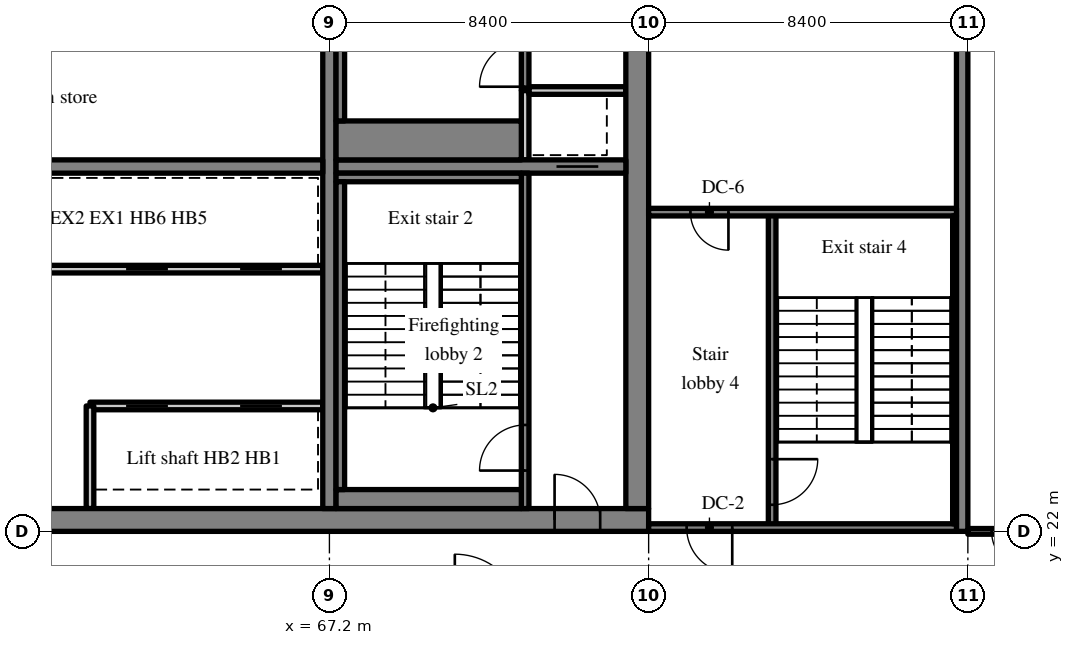
"""IFC4 building model, lengths in metres.
Left out: names, types, materials, properties, quantities, classifications, styles, units other than length and angle.
Written with IfcOpenShell. Run it as: python <this file> out.ifc"""

import sys

from ifc_helpers import new_model, si_unit, direction, frame, frame_2d, origin, place, context, subcontext, project, spatial, rectangle, extrude, source, transform, mapped, element, fill, save


model = new_model("IFC4")
c1 = context("Model", 3, precision=1e-05, world=origin(), true_north=direction((0.0, 1.0)))
c2 = subcontext(c1, "Body", "Model", "MODEL_VIEW")
j1 = project(units=[si_unit("LENGTHUNIT", "METRE"), si_unit("PLANEANGLEUNIT", "RADIAN")], contexts=[c1])
p1 = place(None, origin())
s1 = spatial("IfcSite", under=j1, at=p1, CompositionType="ELEMENT")
p2 = place(p1, origin())
s2 = spatial("IfcBuilding", under=s1, at=p2, CompositionType="ELEMENT")
p3 = place(p2, frame((0.0, 0.0, 229.6)))
s3 = spatial("IfcBuildingStorey", under=s2, at=p3, CompositionType="ELEMENT", Elevation=229.6)
m1 = source(origin(), c2, "Body", "SweptSolid", [
    extrude(rectangle(XDim=50.4, YDim=0.6, at=frame_2d((25.2, 0.0))), origin(), (0.0, 0.0, 1.0), 3.62),
])
p4 = place(p3, frame((25.2, 22.3, 0.0), z_axis=(0.0, 0.0, 1.0), x_axis=(1.0, 0.0, 0.0)))
e1 = element("IfcWall", 1, at=p4, inside=s3, PredefinedType="SHEAR", context=c2, shape_type="MappedRepresentation", body=[
    mapped(m1, transform((0.0, 0.0, 0.0), scale=1.0)),
])
m2 = source(origin(), c2, "Body", "SweptSolid", [
    extrude(rectangle(XDim=1.8, YDim=2.1, at=frame_2d((0.9, 1.05))), frame((0.0, 0.31, 0.0), z_axis=(0.0, -1.0, 0.0), x_axis=(1.0, 0.0, 0.0)), (0.0, 0.0, 1.0), 0.62),
])
p5 = place(p4, frame((15.9, 0.0, 0.0)))
e2 = element("IfcOpeningElement", 2, at=p5, cuts=e1, PredefinedType="OPENING", context=c2, shape_type="MappedRepresentation", body=[
    mapped(m2, transform((0.0, 0.0, 0.0), scale=1.0)),
])
m3 = source(origin(), c2, "Body", "SweptSolid", [
    extrude(rectangle(XDim=0.9, YDim=2.1, at=frame_2d((0.45, 1.05))), frame((0.0, 0.31, 0.0), z_axis=(0.0, -1.0, 0.0), x_axis=(1.0, 0.0, 0.0)), (0.0, 0.0, 1.0), 0.62),
])
p6 = place(p4, frame((11.187, 0.0, 0.0)))
e3 = element("IfcOpeningElement", 3, at=p6, cuts=e1, PredefinedType="OPENING", context=c2, shape_type="MappedRepresentation", body=[
    mapped(m3, transform((0.0, 0.0, 0.0), scale=1.0)),
])
p7 = place(p4, frame((21.513, 0.0, 0.0)))
e4 = element("IfcOpeningElement", 4, at=p7, cuts=e1, PredefinedType="OPENING", context=c2, shape_type="MappedRepresentation", body=[
    mapped(m3, transform((0.0, 0.0, 0.0), scale=1.0)),
])
p8 = place(p4, frame((32.7, 0.0, 0.0)))
e5 = element("IfcOpeningElement", 5, at=p8, cuts=e1, PredefinedType="OPENING", context=c2, shape_type="MappedRepresentation", body=[
    mapped(m2, transform((0.0, 0.0, 0.0), scale=1.0)),
])
m4 = source(origin(), c2, "Body", "SweptSolid", [
    extrude(rectangle(XDim=1.2, YDim=2.1, at=frame_2d((0.6, 1.05))), frame((0.0, 0.31, 0.0), z_axis=(0.0, -1.0, 0.0), x_axis=(1.0, 0.0, 0.0)), (0.0, 0.0, 1.0), 0.62),
])
p9 = place(p4, frame((6.488, 0.0, 0.0)))
e6 = element("IfcOpeningElement", 6, at=p9, cuts=e1, PredefinedType="OPENING", context=c2, shape_type="MappedRepresentation", body=[
    mapped(m4, transform((0.0, 0.0, 0.0), scale=1.0)),
])
p10 = place(p4, frame((47.925, 0.0, 0.0)))
e7 = element("IfcOpeningElement", 7, at=p10, cuts=e1, PredefinedType="OPENING", context=c2, shape_type="MappedRepresentation", body=[
    mapped(m4, transform((0.0, 0.0, 0.0), scale=1.0)),
])
m5 = source(origin(), c2, "Body", "SweptSolid", [
    extrude(rectangle(XDim=18.8, YDim=0.6, at=frame_2d((9.4, 0.0))), origin(), (0.0, 0.0, 1.0), 3.62),
])
p11 = place(p3, frame((75.3, 22.6, 0.0), z_axis=(0.0, 0.0, 1.0), x_axis=(0.0, 1.0, 0.0)))
e8 = element("IfcWall", 8, at=p11, inside=s3, PredefinedType="SHEAR", context=c2, shape_type="MappedRepresentation", body=[
    mapped(m5, transform((0.0, 0.0, 0.0), scale=1.0)),
])
p12 = place(p11, frame((12.8, 0.0, 0.0)))
e9 = element("IfcOpeningElement", 9, at=p12, cuts=e8, PredefinedType="OPENING", context=c2, shape_type="MappedRepresentation", body=[
    mapped(m4, transform((0.0, 0.0, 0.0), scale=1.0)),
])
m6 = source(origin(), c2, "Body", "SweptSolid", [
    extrude(rectangle(XDim=18.8, YDim=0.35, at=frame_2d((9.4, 0.0))), origin(), (0.0, 0.0, 1.0), 3.62),
])
p13 = place(p3, frame((67.2, 22.6, 0.0), z_axis=(0.0, 0.0, 1.0), x_axis=(0.0, 1.0, 0.0)))
e10 = element("IfcWall", 10, at=p13, inside=s3, PredefinedType="SHEAR", context=c2, shape_type="MappedRepresentation", body=[
    mapped(m6, transform((0.0, 0.0, 0.0), scale=1.0)),
])
m7 = source(origin(), c2, "Body", "SweptSolid", [
    extrude(rectangle(XDim=16.45, YDim=0.35, at=frame_2d((8.225, 0.0))), origin(), (0.0, 0.0, 1.0), 3.62),
])
p14 = place(p3, frame((50.575, 31.6, 0.0), z_axis=(0.0, 0.0, 1.0), x_axis=(1.0, 0.0, 0.0)))
e11 = element("IfcWall", 11, at=p14, inside=s3, PredefinedType="SHEAR", context=c2, shape_type="MappedRepresentation", body=[
    mapped(m7, transform((0.0, 0.0, 0.0), scale=1.0)),
])
m8 = source(origin(), c2, "Body", "SweptSolid", [
    extrude(rectangle(XDim=1.0, YDim=2.1, at=frame_2d((0.5, 1.05))), frame((0.0, 0.185, 0.0), z_axis=(0.0, -1.0, 0.0), x_axis=(1.0, 0.0, 0.0)), (0.0, 0.0, 1.0), 0.37),
])
p15 = place(p14, frame((0.613, 0.0, 0.0)))
e12 = element("IfcOpeningElement", 12, at=p15, cuts=e11, PredefinedType="OPENING", context=c2, shape_type="MappedRepresentation", body=[
    mapped(m8, transform((0.0, 0.0, 0.0), scale=1.0)),
])
m9 = source(origin(), c2, "Body", "SweptSolid", [
    extrude(rectangle(XDim=7.625, YDim=0.35, at=frame_2d((3.812, 0.0))), origin(), (0.0, 0.0, 1.0), 3.62),
])
p16 = place(p3, frame((67.375, 31.6, 0.0), z_axis=(0.0, 0.0, 1.0), x_axis=(1.0, 0.0, 0.0)))
e13 = element("IfcWall", 13, at=p16, inside=s3, PredefinedType="SHEAR", context=c2, shape_type="MappedRepresentation", body=[
    mapped(m9, transform((0.0, 0.0, 0.0), scale=1.0)),
])
m10 = source(origin(), c2, "Body", "SweptSolid", [
    extrude(rectangle(XDim=1.1, YDim=2.1, at=frame_2d((0.55, 1.05))), frame((0.0, 0.185, 0.0), z_axis=(0.0, -1.0, 0.0), x_axis=(1.0, 0.0, 0.0)), (0.0, 0.0, 1.0), 0.37),
])
p17 = place(p16, frame((5.8, 0.0, 0.0)))
e14 = element("IfcOpeningElement", 14, at=p17, cuts=e13, PredefinedType="OPENING", context=c2, shape_type="MappedRepresentation", body=[
    mapped(m10, transform((0.0, 0.0, 0.0), scale=1.0)),
])
m11 = source(origin(), c2, "Body", "SweptSolid", [
    extrude(rectangle(XDim=18.4, YDim=0.3, at=frame_2d((9.2, 0.0))), origin(), (0.0, 0.0, 1.0), 3.62),
])
p18 = place(p3, frame((83.85, 22.0, 0.0), z_axis=(0.0, 0.0, 1.0), x_axis=(0.0, 1.0, 0.0)))
e15 = element("IfcWall", 15, at=p18, inside=s3, PredefinedType="SHEAR", context=c2, shape_type="MappedRepresentation", body=[
    mapped(m11, transform((0.0, 0.0, 0.0), scale=1.0)),
])
m12 = source(origin(), c2, "Body", "SweptSolid", [
    extrude(rectangle(XDim=6.125, YDim=0.2, at=frame_2d((3.062, 0.0))), origin(), (0.0, 0.0, 1.0), 3.62),
])
p19 = place(p3, frame((67.025, 25.3, 0.0), z_axis=(0.0, 0.0, 1.0), x_axis=(-1.0, 0.0, 0.0)))
e16 = element("IfcWall", 16, at=p19, inside=s3, PredefinedType="SOLIDWALL", context=c2, shape_type="MappedRepresentation", body=[
    mapped(m12, transform((0.0, 0.0, 0.0), scale=1.0)),
])
m13 = source(origin(), c2, "Body", "SweptSolid", [
    extrude(rectangle(XDim=1.1, YDim=2.1, at=frame_2d((0.55, 1.05))), frame((0.0, 0.11, 0.0), z_axis=(0.0, -1.0, 0.0), x_axis=(1.0, 0.0, 0.0)), (0.0, 0.0, 1.0), 0.22),
])
p20 = place(p19, frame((1.075, 0.0, 0.0)))
e17 = element("IfcOpeningElement", 17, at=p20, cuts=e16, PredefinedType="OPENING", context=c2, shape_type="MappedRepresentation", body=[
    mapped(m13, transform((0.0, 0.0, 0.0), scale=1.0)),
])
p21 = place(p19, frame((4.075, 0.0, 0.0)))
e18 = element("IfcOpeningElement", 18, at=p21, cuts=e16, PredefinedType="OPENING", context=c2, shape_type="MappedRepresentation", body=[
    mapped(m13, transform((0.0, 0.0, 0.0), scale=1.0)),
])
m14 = source(origin(), c2, "Body", "SweptSolid", [
    extrude(rectangle(XDim=12.125, YDim=0.2, at=frame_2d((6.062, 0.0))), origin(), (0.0, 0.0, 1.0), 3.62),
])
p22 = place(p3, frame((67.025, 28.9, 0.0), z_axis=(0.0, 0.0, 1.0), x_axis=(-1.0, 0.0, 0.0)))
e19 = element("IfcWall", 19, at=p22, inside=s3, PredefinedType="SOLIDWALL", context=c2, shape_type="MappedRepresentation", body=[
    mapped(m14, transform((0.0, 0.0, 0.0), scale=1.0)),
])
p23 = place(p22, frame((1.075, 0.0, 0.0)))
e20 = element("IfcOpeningElement", 20, at=p23, cuts=e19, PredefinedType="OPENING", context=c2, shape_type="MappedRepresentation", body=[
    mapped(m13, transform((0.0, 0.0, 0.0), scale=1.0)),
])
p24 = place(p22, frame((4.075, 0.0, 0.0)))
e21 = element("IfcOpeningElement", 21, at=p24, cuts=e19, PredefinedType="OPENING", context=c2, shape_type="MappedRepresentation", body=[
    mapped(m13, transform((0.0, 0.0, 0.0), scale=1.0)),
])
m15 = source(origin(), c2, "Body", "SweptSolid", [
    extrude(rectangle(XDim=2.7, YDim=0.2, at=frame_2d((1.35, 0.0))), origin(), (0.0, 0.0, 1.0), 3.62),
])
p25 = place(p3, frame((60.9, 22.6, 0.0), z_axis=(0.0, 0.0, 1.0), x_axis=(0.0, 1.0, 0.0)))
e22 = element("IfcWall", 22, at=p25, inside=s3, PredefinedType="SOLIDWALL", context=c2, shape_type="MappedRepresentation", body=[
    mapped(m15, transform((0.0, 0.0, 0.0), scale=1.0)),
])
m16 = source(origin(), c2, "Body", "SweptSolid", [
    extrude(rectangle(XDim=8.825, YDim=0.2, at=frame_2d((4.413, 0.0))), origin(), (0.0, 0.0, 1.0), 3.62),
])
p26 = place(p3, frame((72.35, 22.6, 0.0), z_axis=(0.0, 0.0, 1.0), x_axis=(0.0, 1.0, 0.0)))
e23 = element("IfcWall", 23, at=p26, inside=s3, PredefinedType="SOLIDWALL", context=c2, shape_type="MappedRepresentation", body=[
    mapped(m16, transform((0.0, 0.0, 0.0), scale=1.0)),
])
m17 = source(origin(), c2, "Body", "SweptSolid", [
    extrude(rectangle(XDim=1.2, YDim=2.1, at=frame_2d((0.6, 1.05))), frame((0.0, 0.11, 0.0), z_axis=(0.0, -1.0, 0.0), x_axis=(1.0, 0.0, 0.0)), (0.0, 0.0, 1.0), 0.22),
])
p27 = place(p26, frame((1.0, 0.0, 0.0)))
e24 = element("IfcOpeningElement", 24, at=p27, cuts=e23, PredefinedType="OPENING", context=c2, shape_type="MappedRepresentation", body=[
    mapped(m17, transform((0.0, 0.0, 0.0), scale=1.0)),
])
m18 = source(origin(), c2, "Body", "SweptSolid", [
    extrude(rectangle(XDim=1.825, YDim=0.2, at=frame_2d((0.913, 0.0))), origin(), (0.0, 0.0, 1.0), 3.62),
])
p28 = place(p3, frame((72.35, 31.775, 0.0), z_axis=(0.0, 0.0, 1.0), x_axis=(0.0, 1.0, 0.0)))
e25 = element("IfcWall", 25, at=p28, inside=s3, PredefinedType="SOLIDWALL", context=c2, shape_type="MappedRepresentation", body=[
    mapped(m18, transform((0.0, 0.0, 0.0), scale=1.0)),
])
m19 = source(origin(), c2, "Body", "SweptSolid", [
    extrude(rectangle(XDim=2.55, YDim=0.2, at=frame_2d((1.275, 0.0))), origin(), (0.0, 0.0, 1.0), 3.62),
])
p29 = place(p3, frame((72.45, 33.6, 0.0), z_axis=(0.0, 0.0, 1.0), x_axis=(1.0, 0.0, 0.0)))
e26 = element("IfcWall", 26, at=p29, inside=s3, PredefinedType="SOLIDWALL", context=c2, shape_type="MappedRepresentation", body=[
    mapped(m19, transform((0.0, 0.0, 0.0), scale=1.0)),
])
m20 = source(origin(), c2, "Body", "SweptSolid", [
    extrude(rectangle(XDim=7.8, YDim=0.2, at=frame_2d((3.9, 0.0))), origin(), (0.0, 0.0, 1.0), 3.62),
])
p30 = place(p3, frame((72.35, 33.6, 0.0), z_axis=(0.0, 0.0, 1.0), x_axis=(0.0, 1.0, 0.0)))
e27 = element("IfcWall", 27, at=p30, inside=s3, PredefinedType="SOLIDWALL", context=c2, shape_type="MappedRepresentation", body=[
    mapped(m20, transform((0.0, 0.0, 0.0), scale=1.0)),
])
p31 = place(p30, frame((0.1, 0.0, 0.0)))
e28 = element("IfcOpeningElement", 28, at=p31, cuts=e27, PredefinedType="OPENING", context=c2, shape_type="MappedRepresentation", body=[
    mapped(m17, transform((0.0, 0.0, 0.0), scale=1.0)),
])
m21 = source(origin(), c2, "Body", "SweptSolid", [
    extrude(rectangle(XDim=8.3, YDim=0.2, at=frame_2d((4.15, 0.0))), origin(), (0.0, 0.0, 1.0), 3.62),
])
p32 = place(p3, frame((78.85, 22.1, 0.0), z_axis=(0.0, 0.0, 1.0), x_axis=(0.0, 1.0, 0.0)))
e29 = element("IfcWall", 29, at=p32, inside=s3, PredefinedType="SOLIDWALL", context=c2, shape_type="MappedRepresentation", body=[
    mapped(m21, transform((0.0, 0.0, 0.0), scale=1.0)),
])
p33 = place(p32, frame((0.6, 0.0, 0.0)))
e30 = element("IfcOpeningElement", 30, at=p33, cuts=e29, PredefinedType="OPENING", context=c2, shape_type="MappedRepresentation", body=[
    mapped(m17, transform((0.0, 0.0, 0.0), scale=1.0)),
])
m22 = source(origin(), c2, "Body", "SweptSolid", [
    extrude(rectangle(XDim=8.1, YDim=0.2, at=frame_2d((4.05, 0.0))), origin(), (0.0, 0.0, 1.0), 3.62),
])
p34 = place(p3, frame((83.7, 22.1, 0.0), z_axis=(0.0, 0.0, 1.0), x_axis=(-1.0, 0.0, 0.0)))
e31 = element("IfcWall", 31, at=p34, inside=s3, PredefinedType="SOLIDWALL", context=c2, shape_type="MappedRepresentation", body=[
    mapped(m22, transform((0.0, 0.0, 0.0), scale=1.0)),
])
p35 = place(p34, frame((5.9, 0.0, 0.0)))
e32 = element("IfcOpeningElement", 32, at=p35, cuts=e31, PredefinedType="OPENING", context=c2, shape_type="MappedRepresentation", body=[
    mapped(m17, transform((0.0, 0.0, 0.0), scale=1.0)),
])
p36 = place(p3, frame((83.7, 30.4, 0.0), z_axis=(0.0, 0.0, 1.0), x_axis=(-1.0, 0.0, 0.0)))
e33 = element("IfcWall", 33, at=p36, inside=s3, PredefinedType="SOLIDWALL", context=c2, shape_type="MappedRepresentation", body=[
    mapped(m22, transform((0.0, 0.0, 0.0), scale=1.0)),
])
m23 = source(origin(), c2, "Body", "SweptSolid", [
    extrude(rectangle(XDim=1.0, YDim=2.1, at=frame_2d((0.5, 1.05))), frame((0.0, 0.11, 0.0), z_axis=(0.0, -1.0, 0.0), x_axis=(1.0, 0.0, 0.0)), (0.0, 0.0, 1.0), 0.22),
])
p37 = place(p36, frame((6.0, 0.0, 0.0)))
e34 = element("IfcOpeningElement", 34, at=p37, cuts=e33, PredefinedType="OPENING", context=c2, shape_type="MappedRepresentation", body=[
    mapped(m23, transform((0.0, 0.0, 0.0), scale=1.0)),
])
m24 = source(origin(), c2, "Body", "SweptSolid", [
    extrude(rectangle(XDim=4.875, YDim=0.5, at=frame_2d((2.438, 0.0))), origin(), (0.0, 0.0, 1.0), 3.62),
])
p38 = place(p3, frame((67.375, 22.85, 0.0), z_axis=(0.0, 0.0, 1.0), x_axis=(1.0, 0.0, 0.0)))
e35 = element("IfcWall", 35, at=p38, inside=s3, PredefinedType="SOLIDWALL", context=c2, shape_type="MappedRepresentation", body=[
    mapped(m24, transform((0.0, 0.0, 0.0), scale=1.0)),
])
m25 = source(origin(), c2, "Body", "SweptSolid", [
    extrude(rectangle(XDim=4.875, YDim=0.225, at=frame_2d((2.438, 0.0))), origin(), (0.0, 0.0, 1.0), 3.62),
])
p39 = place(p3, frame((67.375, 31.312, 0.0), z_axis=(0.0, 0.0, 1.0), x_axis=(1.0, 0.0, 0.0)))
e36 = element("IfcWall", 36, at=p39, inside=s3, PredefinedType="SOLIDWALL", context=c2, shape_type="MappedRepresentation", body=[
    mapped(m25, transform((0.0, 0.0, 0.0), scale=1.0)),
])
m26 = source(origin(), c2, "Body", "SweptSolid", [
    extrude(rectangle(XDim=8.1, YDim=0.225, at=frame_2d((4.05, 0.0))), origin(), (0.0, 0.0, 1.0), 3.62),
])
p40 = place(p3, frame((67.487, 23.1, 0.0), z_axis=(0.0, 0.0, 1.0), x_axis=(0.0, 1.0, 0.0)))
e37 = element("IfcWall", 37, at=p40, inside=s3, PredefinedType="SOLIDWALL", context=c2, shape_type="MappedRepresentation", body=[
    mapped(m26, transform((0.0, 0.0, 0.0), scale=1.0)),
])
m27 = source(origin(), c2, "Body", "SweptSolid", [
    extrude(rectangle(XDim=4.875, YDim=1.025, at=frame_2d((2.438, 0.0))), origin(), (0.0, 0.0, 1.0), 3.62),
])
p41 = place(p3, frame((67.375, 32.287, 0.0), z_axis=(0.0, 0.0, 1.0), x_axis=(1.0, 0.0, 0.0)))
e38 = element("IfcWall", 38, at=p41, inside=s3, PredefinedType="SOLIDWALL", context=c2, shape_type="MappedRepresentation", body=[
    mapped(m27, transform((0.0, 0.0, 0.0), scale=1.0)),
])
p42 = place(p3, frame((67.487, 32.8, 0.0), z_axis=(0.0, 0.0, 1.0), x_axis=(0.0, 1.0, 0.0)))
e39 = element("IfcWall", 39, at=p42, inside=s3, PredefinedType="SOLIDWALL", context=c2, shape_type="MappedRepresentation", body=[
    mapped(m26, transform((0.0, 0.0, 0.0), scale=1.0)),
])
m28 = source(origin(), c2, "Body", "SweptSolid", [
    extrude(rectangle(XDim=8.1, YDim=0.1, at=frame_2d((4.05, 0.0))), origin(), (0.0, 0.0, 1.0), 3.62),
])
p43 = place(p3, frame((83.65, 22.2, 0.0), z_axis=(0.0, 0.0, 1.0), x_axis=(0.0, 1.0, 0.0)))
e40 = element("IfcWall", 40, at=p43, inside=s3, PredefinedType="SOLIDWALL", context=c2, shape_type="MappedRepresentation", body=[
    mapped(m28, transform((0.0, 0.0, 0.0), scale=1.0)),
])
m29 = source(origin(), c2, "Body", "SweptSolid", [
    extrude(rectangle(XDim=1.9, YDim=0.15, at=frame_2d((0.95, 0.0))), origin(), (0.0, 0.0, 1.0), 2.92),
])
p44 = place(p3, frame((84.0, 22.0, 0.0), z_axis=(0.0, 0.0, 1.0), x_axis=(1.0, 0.0, 0.0)))
e41 = element("IfcWall", 41, at=p44, inside=s3, PredefinedType="PARTITIONING", context=c2, shape_type="MappedRepresentation", body=[
    mapped(m29, transform((0.0, 0.0, 0.0), scale=1.0)),
])
m30 = source(origin(), c2, "Body", "SweptSolid", [
    extrude(rectangle(XDim=1.0, YDim=2.1, at=frame_2d((0.5, 1.05))), frame((0.0, 0.085, 0.0), z_axis=(0.0, -1.0, 0.0), x_axis=(1.0, 0.0, 0.0)), (0.0, 0.0, 1.0), 0.17),
])
p45 = place(p44, frame((0.625, 0.0, 0.0)))
e42 = element("IfcOpeningElement", 42, at=p45, cuts=e41, PredefinedType="OPENING", context=c2, shape_type="MappedRepresentation", body=[
    mapped(m30, transform((0.0, 0.0, 0.0), scale=1.0)),
])
m31 = source(origin(), c2, "Body", "SweptSolid", [
    extrude(rectangle(XDim=1.1, YDim=2.1, at=frame_2d((0.55, 1.05))), frame((0.0, 0.025, 0.0), z_axis=(0.0, -1.0, 0.0), x_axis=(1.0, 0.0, 0.0)), (0.0, 0.0, 1.0), 0.05),
])
p46 = place(p20, origin())
e43 = element("IfcDoor", 43, at=p46, inside=s3, OperationType="SLIDING_TO_RIGHT", PredefinedType="DOOR", context=c2, shape_type="MappedRepresentation", body=[
    mapped(m31, transform((0.0, 0.0, 0.0), scale=1.0)),
])
fill(e17, e43)
p47 = place(p21, origin())
e44 = element("IfcDoor", 44, at=p47, inside=s3, OperationType="SLIDING_TO_LEFT", PredefinedType="DOOR", context=c2, shape_type="MappedRepresentation", body=[
    mapped(m31, transform((0.0, 0.0, 0.0), scale=1.0)),
])
fill(e18, e44)
p48 = place(p23, origin())
e45 = element("IfcDoor", 45, at=p48, inside=s3, OperationType="SLIDING_TO_RIGHT", PredefinedType="DOOR", context=c2, shape_type="MappedRepresentation", body=[
    mapped(m31, transform((0.0, 0.0, 0.0), scale=1.0)),
])
fill(e20, e45)
p49 = place(p24, origin())
e46 = element("IfcDoor", 46, at=p49, inside=s3, OperationType="SLIDING_TO_LEFT", PredefinedType="DOOR", context=c2, shape_type="MappedRepresentation", body=[
    mapped(m31, transform((0.0, 0.0, 0.0), scale=1.0)),
])
fill(e21, e46)
m32 = source(origin(), c2, "Body", "SweptSolid", [
    extrude(rectangle(XDim=1.2, YDim=2.1, at=frame_2d((0.6, 1.05))), frame((0.0, 0.025, 0.0), z_axis=(0.0, -1.0, 0.0), x_axis=(1.0, 0.0, 0.0)), (0.0, 0.0, 1.0), 0.05),
])
p50 = place(p27, origin())
e47 = element("IfcDoor", 47, at=p50, inside=s3, OperationType="SINGLE_SWING_LEFT", PredefinedType="DOOR", context=c2, shape_type="MappedRepresentation", body=[
    mapped(m32, transform((0.0, 0.0, 0.0), scale=1.0)),
])
fill(e24, e47)
m33 = source(origin(), c2, "Body", "SweptSolid", [
    extrude(rectangle(XDim=1.2, YDim=2.1, at=frame_2d((0.6, 1.05))), frame((0.0, 0.225, 0.0), z_axis=(0.0, -1.0, 0.0), x_axis=(1.0, 0.0, 0.0)), (0.0, 0.0, 1.0), 0.05),
])
p51 = place(p10, origin())
e48 = element("IfcDoor", 48, at=p51, inside=s3, OperationType="SINGLE_SWING_LEFT", PredefinedType="DOOR", context=c2, shape_type="MappedRepresentation", body=[
    mapped(m33, transform((0.0, 0.0, 0.0), scale=1.0)),
])
fill(e7, e48)
p52 = place(p17, origin())
e49 = element("IfcDoor", 49, at=p52, inside=s3, OperationType="SLIDING_TO_LEFT", PredefinedType="DOOR", context=c2, shape_type="MappedRepresentation", body=[
    mapped(m31, transform((0.0, 0.0, 0.0), scale=1.0)),
])
fill(e14, e49)
p53 = place(p31, origin())
e50 = element("IfcDoor", 50, at=p53, inside=s3, OperationType="SINGLE_SWING_LEFT", PredefinedType="DOOR", context=c2, shape_type="MappedRepresentation", body=[
    mapped(m32, transform((0.0, 0.0, 0.0), scale=1.0)),
])
fill(e28, e50)
p54 = place(p33, origin())
e51 = element("IfcDoor", 51, at=p54, inside=s3, OperationType="SINGLE_SWING_RIGHT", PredefinedType="DOOR", context=c2, shape_type="MappedRepresentation", body=[
    mapped(m32, transform((0.0, 0.0, 0.0), scale=1.0)),
])
fill(e30, e51)
p55 = place(p35, origin())
e52 = element("IfcDoor", 52, at=p55, inside=s3, OperationType="SINGLE_SWING_LEFT", PredefinedType="DOOR", context=c2, shape_type="MappedRepresentation", body=[
    mapped(m32, transform((0.0, 0.0, 0.0), scale=1.0)),
])
fill(e32, e52)
m34 = source(origin(), c2, "Body", "SweptSolid", [
    extrude(rectangle(XDim=1.0, YDim=2.1, at=frame_2d((0.5, 1.05))), frame((0.0, 0.025, 0.0), z_axis=(0.0, -1.0, 0.0), x_axis=(1.0, 0.0, 0.0)), (0.0, 0.0, 1.0), 0.05),
])
p56 = place(p37, origin())
e53 = element("IfcDoor", 53, at=p56, inside=s3, OperationType="SINGLE_SWING_LEFT", PredefinedType="DOOR", context=c2, shape_type="MappedRepresentation", body=[
    mapped(m34, transform((0.0, 0.0, 0.0), scale=1.0)),
])
fill(e34, e53)
p57 = place(p45, origin())
e54 = element("IfcDoor", 54, at=p57, inside=s3, OperationType="SINGLE_SWING_RIGHT", PredefinedType="DOOR", context=c2, shape_type="MappedRepresentation", body=[
    mapped(m34, transform((0.0, 0.0, 0.0), scale=1.0)),
])
fill(e42, e54)
save(model, sys.argv[1])
